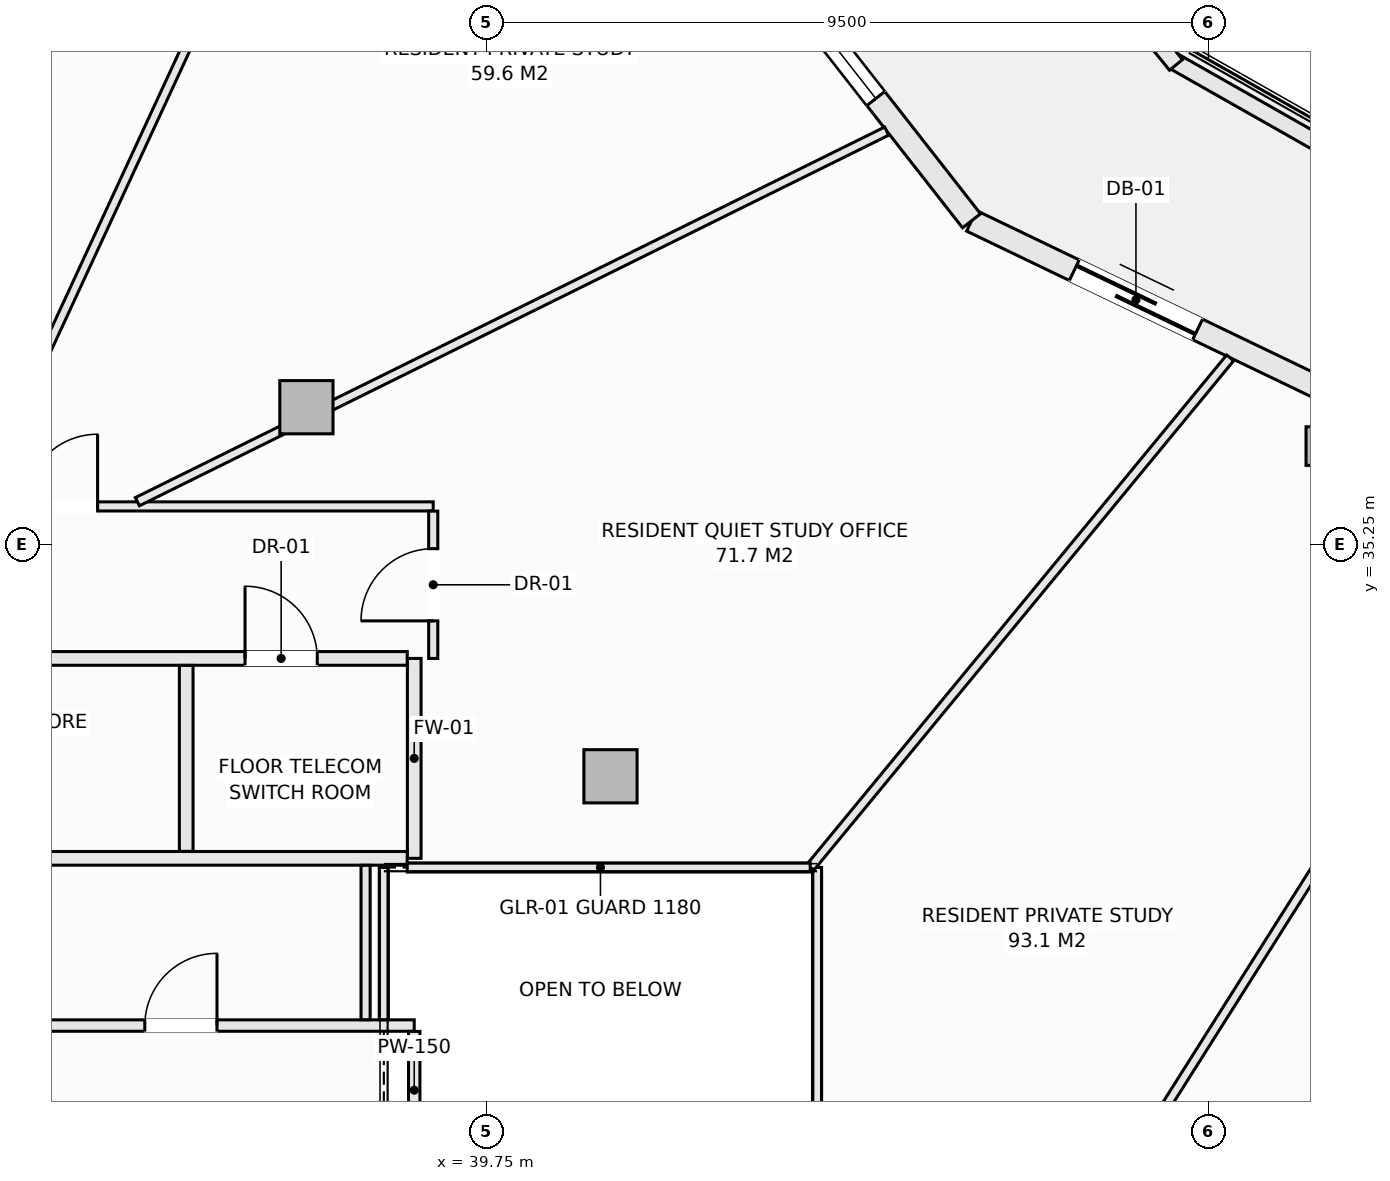
"""IFC4 building model, lengths in metres.
Left out: names, types, materials, properties, quantities, classifications, styles, units other than length and angle.
Written with IfcOpenShell. Run it as: python <this file> out.ifc"""

import sys

from ifc_helpers import new_model, si_unit, direction, frame, frame_2d, origin, origin_2d, place, context, subcontext, project, spatial, rectangle, hollow_rectangle, extrude, element, fill, save


model = new_model("IFC4")
c1 = context("Model", 3, precision=1e-05, world=origin(), true_north=direction((0.0, 1.0)))
c2 = subcontext(c1, "Body", "Model", "MODEL_VIEW")
j1 = project(units=[si_unit("LENGTHUNIT", "METRE"), si_unit("PLANEANGLEUNIT", "RADIAN")], contexts=[c1])
p1 = place(None, origin())
s1 = spatial("IfcSite", under=j1, at=p1, CompositionType="ELEMENT")
p2 = place(p1, origin())
s2 = spatial("IfcBuilding", under=s1, at=p2, CompositionType="ELEMENT")
p3 = place(p2, frame((0.0, 0.0, 203.0)))
s3 = spatial("IfcBuildingStorey", under=s2, at=p3, CompositionType="ELEMENT", Elevation=203.0)
p4 = place(p3, frame((50.787, 36.544, -0.27), z_axis=(0.0, 0.0, 1.0), x_axis=(1.0, 0.0, 0.0)))
e1 = element("IfcColumn", 1, at=p4, inside=s3, PredefinedType="COLUMN", context=c2, shape_type="SweptSolid", body=[
    extrude(hollow_rectangle(XDim=0.508, YDim=0.508, WallThickness=0.019, at=origin_2d()), origin(), (0.0, 0.0, 1.0), 3.3),
])
for number, where, z_axis, x_axis in (
    (2, (41.382, 32.199, -0.27), (0.0, 0.0, 1.0), (1.0, 0.0, 0.0)),
    (3, (37.382, 37.055, -0.27), (0.0, 0.0, 1.0), (1.0, 0.0, 0.0)),
):
    element("IfcColumn", number, at=place(p3, frame(where, z_axis=z_axis, x_axis=x_axis)), inside=s3, PredefinedType="COLUMN", context=c2, shape_type="SweptSolid", body=[
        extrude(rectangle(XDim=0.7, YDim=0.7, at=origin_2d()), origin(), (0.0, 0.0, 1.0), 3.3),
    ])
p5 = place(p3, frame((46.133, 39.507, 0.0), z_axis=(0.0, 0.0, 1.0), x_axis=(0.901348331142, -0.433094892545, 0.0)))
e4 = element("IfcWall", 4, at=p5, inside=s3, PredefinedType="SOLIDWALL", context=c2, shape_type="SweptSolid", body=[
    extrude(rectangle(XDim=6.021, YDim=0.3, at=frame_2d((3.01, 0.0))), origin(), (0.0, 0.0, 1.0), 2.605),
])
p6 = place(p5, frame((1.5, 0.0, 0.0)))
e5 = element("IfcOpeningElement", 5, at=p6, cuts=e4, PredefinedType="OPENING", context=c2, shape_type="SweptSolid", body=[
    extrude(rectangle(XDim=1.8, YDim=2.25, at=frame_2d((0.9, 1.125))), frame((0.0, 0.16, 0.0), z_axis=(0.0, -1.0, 0.0), x_axis=(1.0, 0.0, 0.0)), (0.0, 0.0, 1.0), 0.32),
])
p7 = place(p3, frame((42.5, 44.147, 0.0), z_axis=(0.0, 0.0, 1.0), x_axis=(0.616450126935, -0.787393955401, 0.0)))
e6 = element("IfcWall", 6, at=p7, inside=s3, PredefinedType="SOLIDWALL", context=c2, shape_type="SweptSolid", body=[
    extrude(rectangle(XDim=5.893, YDim=0.3, at=frame_2d((2.946, 0.0))), origin(), (0.0, 0.0, 1.0), 2.605),
])
p8 = place(p7, frame((1.65, 0.0, 0.72)))
e7 = element("IfcOpeningElement", 7, at=p8, cuts=e6, PredefinedType="OPENING", context=c2, shape_type="SweptSolid", body=[
    extrude(rectangle(XDim=2.2, YDim=1.65, at=frame_2d((1.1, 0.825))), frame((0.0, 0.16, 0.0), z_axis=(0.0, -1.0, 0.0), x_axis=(1.0, 0.0, 0.0)), (0.0, 0.0, 1.0), 0.32),
])
p9 = place(p3, frame((48.776, 41.617, 0.0), z_axis=(0.0, 0.0, 1.0), x_axis=(0.869860619267, -0.493297580623, 0.0)))
e8 = element("IfcWall", 8, at=p9, inside=s3, PredefinedType="PARAPET", context=c2, shape_type="SweptSolid", body=[
    extrude(rectangle(XDim=6.743, YDim=0.22, at=frame_2d((3.371, 0.0))), origin(), (0.0, 0.0, 1.0), 0.52),
])
p10 = place(p3, frame((44.448, 46.913, 0.0), z_axis=(0.0, 0.0, 1.0), x_axis=(0.632697312147, -0.774399193699, 0.0)))
e9 = element("IfcWall", 9, at=p10, inside=s3, PredefinedType="PARAPET", context=c2, shape_type="SweptSolid", body=[
    extrude(rectangle(XDim=6.914, YDim=0.22, at=frame_2d((3.457, 0.0))), origin(), (0.0, 0.0, 1.0), 0.52),
])
p11 = place(p3, frame((30.077, 28.92, 0.0), z_axis=(0.0, 0.0, 1.0), x_axis=(1.0, 0.0, 0.0)))
e10 = element("IfcWall", 10, at=p11, inside=s3, PredefinedType="PARTITIONING", context=c2, shape_type="SweptSolid", body=[
    extrude(rectangle(XDim=8.723, YDim=0.15, at=frame_2d((4.362, 0.0))), origin(), (0.0, 0.0, 1.0), 3.03),
])
p12 = place(p11, frame((1.342, 0.0, 0.0)))
e11 = element("IfcOpeningElement", 11, at=p12, cuts=e10, PredefinedType="OPENING", context=c2, shape_type="SweptSolid", body=[
    extrude(rectangle(XDim=0.95, YDim=2.1, at=frame_2d((0.475, 1.05))), frame((0.0, 0.085, 0.0), z_axis=(0.0, -1.0, 0.0), x_axis=(1.0, 0.0, 0.0)), (0.0, 0.0, 1.0), 0.17),
])
p13 = place(p11, frame((5.178, 0.0, 0.0)))
e12 = element("IfcOpeningElement", 12, at=p13, cuts=e10, PredefinedType="OPENING", context=c2, shape_type="SweptSolid", body=[
    extrude(rectangle(XDim=0.95, YDim=2.1, at=frame_2d((0.475, 1.05))), frame((0.0, 0.085, 0.0), z_axis=(0.0, -1.0, 0.0), x_axis=(1.0, 0.0, 0.0)), (0.0, 0.0, 1.0), 0.17),
])
p14 = place(p3, frame((38.8, 27.297, 0.0), z_axis=(0.0, 0.0, 1.0), x_axis=(0.0, 1.0, 0.0)))
e13 = element("IfcWall", 13, at=p14, inside=s3, PredefinedType="PARTITIONING", context=c2, shape_type="SweptSolid", body=[
    extrude(rectangle(XDim=1.546, YDim=0.15, at=frame_2d((0.773, 0.0))), origin(), (0.0, 0.0, 1.0), 3.03),
])
p15 = place(p3, frame((38.8, 31.12, 0.0), z_axis=(0.0, 0.0, 1.0), x_axis=(0.0, 1.0, 0.0)))
e14 = element("IfcWall", 14, at=p15, inside=s3, PredefinedType="SOLIDWALL", context=c2, shape_type="SweptSolid", body=[
    extrude(rectangle(XDim=2.63, YDim=0.18, at=frame_2d((1.315, 0.0))), origin(), (0.0, 0.0, 1.0), 3.03),
])
p16 = place(p3, frame((30.077, 31.12, 0.0), z_axis=(0.0, 0.0, 1.0), x_axis=(1.0, 0.0, 0.0)))
e15 = element("IfcWall", 15, at=p16, inside=s3, PredefinedType="SOLIDWALL", context=c2, shape_type="SweptSolid", body=[
    extrude(rectangle(XDim=8.631, YDim=0.18, at=frame_2d((4.315, 0.0))), origin(), (0.0, 0.0, 1.0), 3.03),
])
p17 = place(p16, frame((2.592, 0.0, 0.0)))
e16 = element("IfcOpeningElement", 16, at=p17, cuts=e15, PredefinedType="OPENING", context=c2, shape_type="SweptSolid", body=[
    extrude(rectangle(XDim=0.95, YDim=2.1, at=frame_2d((0.475, 1.05))), frame((0.0, 0.1, 0.0), z_axis=(0.0, -1.0, 0.0), x_axis=(1.0, 0.0, 0.0)), (0.0, 0.0, 1.0), 0.2),
])
p18 = place(p3, frame((30.077, 33.75, 0.0), z_axis=(0.0, 0.0, 1.0), x_axis=(1.0, 0.0, 0.0)))
e17 = element("IfcWall", 17, at=p18, inside=s3, PredefinedType="SOLIDWALL", context=c2, shape_type="SweptSolid", body=[
    extrude(rectangle(XDim=8.631, YDim=0.18, at=frame_2d((4.315, 0.0))), origin(), (0.0, 0.0, 1.0), 3.03),
])
p19 = place(p18, frame((6.497, 0.0, 0.0)))
e18 = element("IfcOpeningElement", 18, at=p19, cuts=e17, PredefinedType="OPENING", context=c2, shape_type="SweptSolid", body=[
    extrude(rectangle(XDim=0.95, YDim=2.1, at=frame_2d((0.475, 1.05))), frame((0.0, 0.1, 0.0), z_axis=(0.0, -1.0, 0.0), x_axis=(1.0, 0.0, 0.0)), (0.0, 0.0, 1.0), 0.2),
])
p20 = place(p3, frame((35.8, 31.212, 0.0), z_axis=(0.0, 0.0, 1.0), x_axis=(0.0, 1.0, 0.0)))
e19 = element("IfcWall", 19, at=p20, inside=s3, PredefinedType="SOLIDWALL", context=c2, shape_type="SweptSolid", body=[
    extrude(rectangle(XDim=2.446, YDim=0.18, at=frame_2d((1.223, 0.0))), origin(), (0.0, 0.0, 1.0), 3.03),
])
p21 = place(p3, frame((30.062, 35.75, 0.0), z_axis=(0.0, 0.0, 1.0), x_axis=(1.0, 0.0, 0.0)))
e20 = element("IfcWall", 20, at=p21, inside=s3, PredefinedType="PARTITIONING", context=c2, shape_type="SweptSolid", body=[
    extrude(rectangle(XDim=8.988, YDim=0.12, at=frame_2d((4.494, 0.0))), origin(), (0.0, 0.0, 1.0), 2.478),
])
p22 = place(p21, frame((3.622, 0.0, 0.0)))
e21 = element("IfcOpeningElement", 21, at=p22, cuts=e20, PredefinedType="OPENING", context=c2, shape_type="SweptSolid", body=[
    extrude(rectangle(XDim=0.95, YDim=2.1, at=frame_2d((0.475, 1.05))), frame((0.0, 0.07, 0.0), z_axis=(0.0, -1.0, 0.0), x_axis=(1.0, 0.0, 0.0)), (0.0, 0.0, 1.0), 0.14),
])
p23 = place(p21, frame((1.216, 0.0, 0.0)))
e22 = element("IfcOpeningElement", 22, at=p23, cuts=e20, PredefinedType="OPENING", context=c2, shape_type="SweptSolid", body=[
    extrude(rectangle(XDim=0.95, YDim=2.1, at=frame_2d((0.475, 1.05))), frame((0.0, 0.07, 0.0), z_axis=(0.0, -1.0, 0.0), x_axis=(1.0, 0.0, 0.0)), (0.0, 0.0, 1.0), 0.14),
])
p24 = place(p3, frame((39.05, 33.75, 0.0), z_axis=(0.0, 0.0, 1.0), x_axis=(0.0, 1.0, 0.0)))
e23 = element("IfcWall", 23, at=p24, inside=s3, PredefinedType="PARTITIONING", context=c2, shape_type="SweptSolid", body=[
    extrude(rectangle(XDim=1.938, YDim=0.12, at=frame_2d((0.969, 0.0))), origin(), (0.0, 0.0, 1.0), 3.03),
])
p25 = place(p24, frame((0.494, 0.0, 0.0)))
e24 = element("IfcOpeningElement", 24, at=p25, cuts=e23, PredefinedType="OPENING", context=c2, shape_type="SweptSolid", body=[
    extrude(rectangle(XDim=0.95, YDim=2.1, at=frame_2d((0.475, 1.05))), frame((0.0, 0.07, 0.0), z_axis=(0.0, -1.0, 0.0), x_axis=(1.0, 0.0, 0.0)), (0.0, 0.0, 1.0), 0.14),
])
p26 = place(p3, frame((38.16, 28.997, 0.0), z_axis=(0.0, 0.0, 1.0), x_axis=(0.0, 1.0, 0.0)))
e25 = element("IfcWall", 25, at=p26, inside=s3, PredefinedType="PARTITIONING", context=c2, shape_type="SweptSolid", body=[
    extrude(rectangle(XDim=2.031, YDim=0.12, at=frame_2d((1.016, 0.0))), origin(), (0.0, 0.0, 1.0), 3.03),
])
p27 = place(p3, frame((41.582, 16.617, 0.0), z_axis=(0.0, 0.0, 1.0), x_axis=(0.534374121444, 0.845248069108, 0.0)))
e26 = element("IfcWall", 26, at=p27, inside=s3, PredefinedType="PARTITIONING", context=c2, shape_type="SweptSolid", body=[
    extrude(rectangle(XDim=20.892, YDim=0.12, at=frame_2d((10.446, 0.0))), origin(), (0.0, 0.0, 1.0), 3.03),
])
p28 = place(p3, frame((44.1, 27.812, 0.0), z_axis=(0.0, 0.0, 1.0), x_axis=(0.0, 1.0, 0.0)))
e27 = element("IfcWall", 27, at=p28, inside=s3, PredefinedType="PARTITIONING", context=c2, shape_type="SweptSolid", body=[
    extrude(rectangle(XDim=3.188, YDim=0.12, at=frame_2d((1.594, 0.0))), origin(), (0.0, 0.0, 1.0), 3.03),
])
p29 = place(p3, frame((44.01, 31.0, 0.0), z_axis=(0.0, 0.0, 1.0), x_axis=(0.635986973411, 0.771699792439, 0.0)))
e28 = element("IfcWall", 28, at=p29, inside=s3, PredefinedType="PARTITIONING", context=c2, shape_type="SweptSolid", body=[
    extrude(rectangle(XDim=8.687, YDim=0.12, at=frame_2d((4.344, 0.0))), origin(), (0.0, 0.0, 1.0), 2.712),
])
p30 = place(p3, frame((38.708, 31.0, 0.0), z_axis=(0.0, 0.0, 1.0), x_axis=(1.0, 0.0, 0.0)))
e29 = element("IfcWall", 29, at=p30, inside=s3, PredefinedType="PARTITIONING", context=c2, shape_type="SweptSolid", body=[
    extrude(rectangle(XDim=5.302, YDim=0.12, at=frame_2d((2.651, 0.0))), origin(), (0.0, 0.0, 1.0), 3.03),
])
p31 = place(p3, frame((38.4, 28.997, 0.0), z_axis=(0.0, 0.0, 1.0), x_axis=(0.0, 1.0, 0.0)))
e30 = element("IfcWall", 30, at=p31, inside=s3, PredefinedType="PARTITIONING", context=c2, shape_type="SweptSolid", body=[
    extrude(rectangle(XDim=2.003, YDim=0.12, at=frame_2d((1.001, 0.0))), origin(), (0.0, 0.0, 1.0), 3.03),
])
p32 = place(p3, frame((35.157, 35.812, 0.0), z_axis=(0.0, 0.0, 1.0), x_axis=(0.896376577458, 0.443293391992, 0.0)))
e31 = element("IfcWall", 31, at=p32, inside=s3, PredefinedType="PARTITIONING", context=c2, shape_type="SweptSolid", body=[
    extrude(rectangle(XDim=10.998, YDim=0.12, at=frame_2d((5.499, 0.0))), origin(), (0.0, 0.0, 1.0), 2.478),
])
p33 = place(p3, frame((33.038, 35.812, 0.0), z_axis=(0.0, 0.0, 1.0), x_axis=(0.419785881818, 0.907623167083, 0.0)))
e32 = element("IfcWall", 32, at=p33, inside=s3, PredefinedType="PARTITIONING", context=c2, shape_type="SweptSolid", body=[
    extrude(rectangle(XDim=10.806, YDim=0.12, at=frame_2d((5.403, 0.0))), origin(), (0.0, 0.0, 1.0), 3.03),
])
p34 = place(p6, origin())
e33 = element("IfcDoor", 33, at=p34, inside=s3, OperationType="SLIDING_TO_LEFT", PredefinedType="DOOR", context=c2, shape_type="SweptSolid", body=[
    extrude(rectangle(XDim=1.8, YDim=2.25, at=frame_2d((0.9, 1.125))), frame((0.0, 0.025, 0.0), z_axis=(0.0, -1.0, 0.0), x_axis=(1.0, 0.0, 0.0)), (0.0, 0.0, 1.0), 0.05),
])
fill(e5, e33)
p35 = place(p8, origin())
e34 = element("IfcWindow", 34, at=p35, inside=s3, PartitioningType="SINGLE_PANEL", PredefinedType="WINDOW", context=c2, shape_type="SweptSolid", body=[
    extrude(rectangle(XDim=2.2, YDim=1.65, at=frame_2d((1.1, 0.825))), frame((0.0, 0.03, 0.0), z_axis=(0.0, -1.0, 0.0), x_axis=(1.0, 0.0, 0.0)), (0.0, 0.0, 1.0), 0.06),
])
fill(e7, e34)
p36 = place(p13, origin())
e35 = element("IfcDoor", 35, at=p36, inside=s3, OperationType="SINGLE_SWING_RIGHT", PredefinedType="DOOR", context=c2, shape_type="SweptSolid", body=[
    extrude(rectangle(XDim=0.95, YDim=2.1, at=frame_2d((0.475, 1.05))), frame((0.0, 0.025, 0.0), z_axis=(0.0, -1.0, 0.0), x_axis=(1.0, 0.0, 0.0)), (0.0, 0.0, 1.0), 0.05),
])
fill(e12, e35)
p37 = place(p19, origin())
e36 = element("IfcDoor", 36, at=p37, inside=s3, OperationType="SINGLE_SWING_LEFT", PredefinedType="DOOR", context=c2, shape_type="SweptSolid", body=[
    extrude(rectangle(XDim=0.95, YDim=2.1, at=frame_2d((0.475, 1.05))), frame((0.0, 0.025, 0.0), z_axis=(0.0, -1.0, 0.0), x_axis=(1.0, 0.0, 0.0)), (0.0, 0.0, 1.0), 0.05),
])
fill(e18, e36)
p38 = place(p25, origin())
e37 = element("IfcDoor", 37, at=p38, inside=s3, OperationType="SINGLE_SWING_LEFT", PredefinedType="DOOR", context=c2, shape_type="SweptSolid", body=[
    extrude(rectangle(XDim=0.95, YDim=2.1, at=frame_2d((0.475, 1.05))), frame((0.0, 0.025, 0.0), z_axis=(0.0, -1.0, 0.0), x_axis=(1.0, 0.0, 0.0)), (0.0, 0.0, 1.0), 0.05),
])
fill(e24, e37)
p39 = place(p22, origin())
e38 = element("IfcDoor", 38, at=p39, inside=s3, OperationType="SINGLE_SWING_RIGHT", PredefinedType="DOOR", context=c2, shape_type="SweptSolid", body=[
    extrude(rectangle(XDim=0.95, YDim=2.1, at=frame_2d((0.475, 1.05))), frame((0.0, 0.025, 0.0), z_axis=(0.0, -1.0, 0.0), x_axis=(1.0, 0.0, 0.0)), (0.0, 0.0, 1.0), 0.05),
])
fill(e21, e38)
save(model, sys.argv[1])
